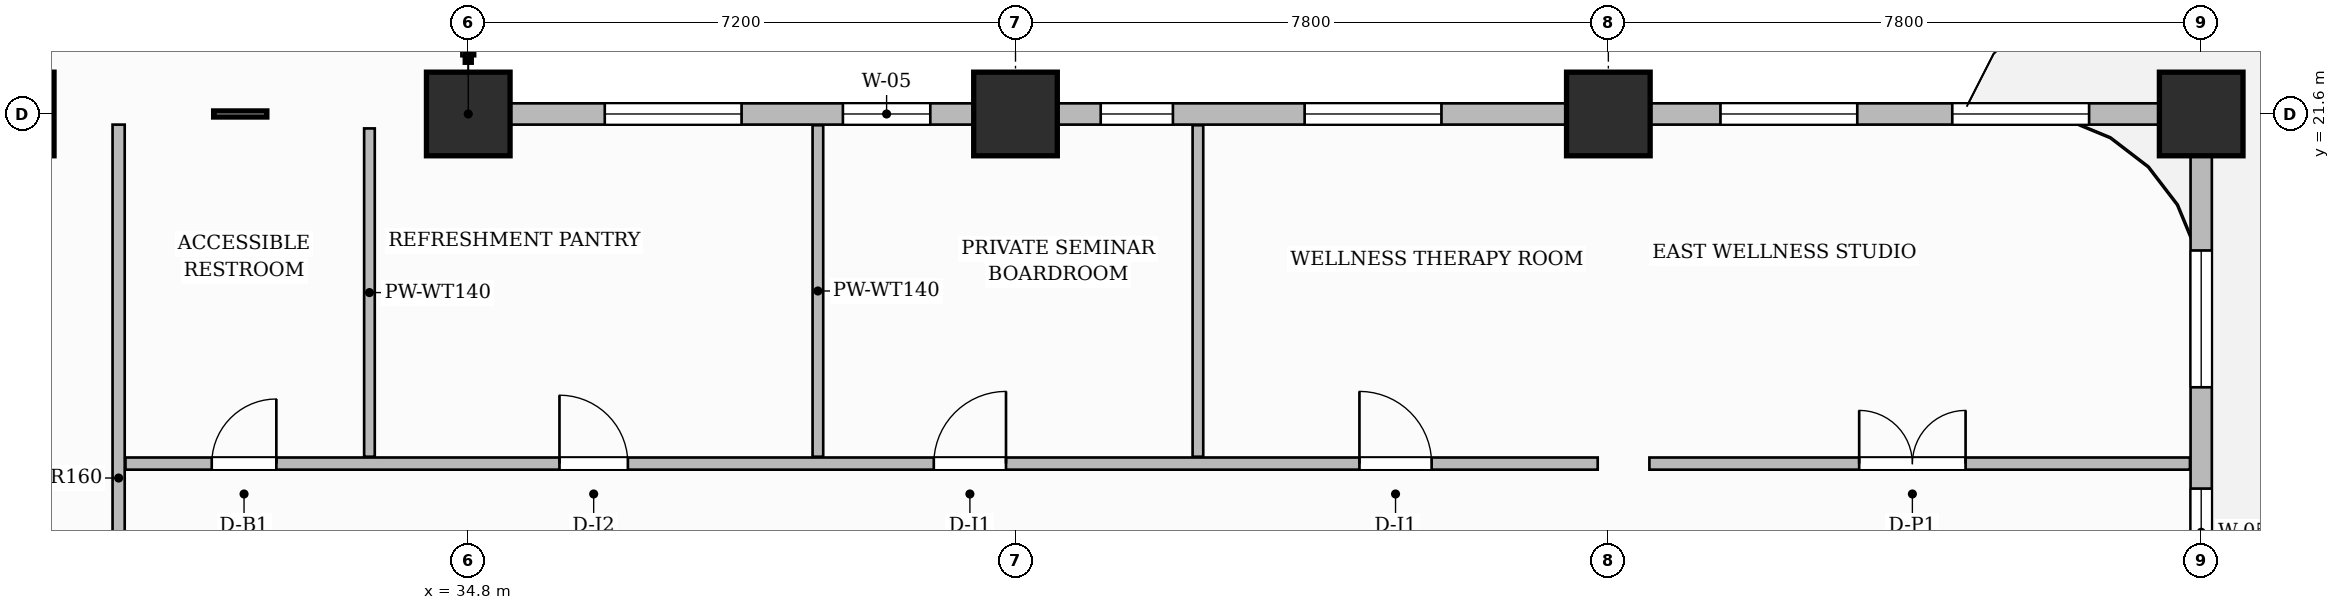
"""IFC4 building model, lengths in metres.
Left out: names, types, materials, properties, quantities, classifications, styles, units other than length and angle.
Written with IfcOpenShell. Run it as: python <this file> out.ifc"""

import sys

from ifc_helpers import new_model, si_unit, direction, frame, frame_2d, origin, origin_2d, place, context, subcontext, project, spatial, rectangle, extrude, source, transform, mapped, element, fill, save


model = new_model("IFC4")
c1 = context("Model", 3, precision=1e-05, world=origin(), true_north=direction((0.0, 1.0)))
c2 = subcontext(c1, "Body", "Model", "MODEL_VIEW")
j1 = project(units=[si_unit("LENGTHUNIT", "METRE"), si_unit("PLANEANGLEUNIT", "RADIAN")], contexts=[c1])
p1 = place(None, origin())
s1 = spatial("IfcSite", under=j1, at=p1, CompositionType="ELEMENT")
p2 = place(p1, origin())
s2 = spatial("IfcBuilding", under=s1, at=p2, CompositionType="ELEMENT")
p3 = place(p2, frame((0.0, 0.0, 65.7)))
s3 = spatial("IfcBuildingStorey", under=s2, at=p3, CompositionType="ELEMENT", Elevation=65.7)
m1 = source(origin(), c2, "Body", "SweptSolid", [
    extrude(rectangle(XDim=1.1, YDim=1.1, at=origin_2d()), origin(), (0.0, 0.0, 1.0), 3.7),
])
for number, where, z_axis, x_axis in (
    (1, (28.8, 21.6, 0.0), (0.0, 0.0, 1.0), (1.0, 0.0, 0.0)),
    (2, (34.8, 21.6, 0.0), (0.0, 0.0, 1.0), (1.0, 0.0, 0.0)),
    (3, (42.0, 21.6, 0.0), (0.0, 0.0, 1.0), (1.0, 0.0, 0.0)),
    (4, (49.8, 21.6, 0.0), (0.0, 0.0, 1.0), (1.0, 0.0, 0.0)),
    (5, (57.6, 21.6, 0.0), (0.0, 0.0, 1.0), (1.0, 0.0, 0.0)),
):
    element("IfcColumn", number, at=place(p3, frame(where, z_axis=z_axis, x_axis=x_axis)), inside=s3, PredefinedType="COLUMN", context=c2, shape_type="MappedRepresentation", body=[
        mapped(m1, transform((0.0, 0.0, 0.0), scale=1.0)),
    ])
p4 = place(p3, frame((30.2, 12.16, 0.0), z_axis=(0.0, 0.0, 1.0), x_axis=(0.0, 1.0, 0.0)))
e6 = element("IfcWall", 6, at=p4, inside=s3, PredefinedType="PARTITIONING", context=c2, shape_type="SweptSolid", body=[
    extrude(rectangle(XDim=9.3, YDim=0.16, at=frame_2d((4.65, 0.0))), origin(), (0.0, 0.0, 1.0), 3.45),
])
p5 = place(p3, frame((30.29, 17.0, 0.0), z_axis=(0.0, 0.0, 1.0), x_axis=(1.0, 0.0, 0.0)))
e7 = element("IfcWall", 7, at=p5, inside=s3, PredefinedType="PARTITIONING", context=c2, shape_type="SweptSolid", body=[
    extrude(rectangle(XDim=19.37, YDim=0.16, at=frame_2d((9.685, 0.0))), origin(), (0.0, 0.0, 1.0), 3.45),
])
p6 = place(p5, frame((1.135, 0.0, 0.0)))
e8 = element("IfcOpeningElement", 8, at=p6, cuts=e7, PredefinedType="OPENING", context=c2, shape_type="SweptSolid", body=[
    extrude(rectangle(XDim=0.85, YDim=2.1, at=frame_2d((0.425, 1.05))), frame((0.0, 0.09, 0.0), z_axis=(0.0, -1.0, 0.0), x_axis=(1.0, 0.0, 0.0)), (0.0, 0.0, 1.0), 0.18),
])
p7 = place(p5, frame((5.71, 0.0, 0.0)))
e9 = element("IfcOpeningElement", 9, at=p7, cuts=e7, PredefinedType="OPENING", context=c2, shape_type="SweptSolid", body=[
    extrude(rectangle(XDim=0.9, YDim=2.15, at=frame_2d((0.45, 1.075))), frame((0.0, 0.09, 0.0), z_axis=(0.0, -1.0, 0.0), x_axis=(1.0, 0.0, 0.0)), (0.0, 0.0, 1.0), 0.18),
])
p8 = place(p5, frame((10.635, 0.0, 0.0)))
e10 = element("IfcOpeningElement", 10, at=p8, cuts=e7, PredefinedType="OPENING", context=c2, shape_type="SweptSolid", body=[
    extrude(rectangle(XDim=0.95, YDim=2.15, at=frame_2d((0.475, 1.075))), frame((0.0, 0.09, 0.0), z_axis=(0.0, -1.0, 0.0), x_axis=(1.0, 0.0, 0.0)), (0.0, 0.0, 1.0), 0.18),
])
p9 = place(p5, frame((16.235, 0.0, 0.0)))
e11 = element("IfcOpeningElement", 11, at=p9, cuts=e7, PredefinedType="OPENING", context=c2, shape_type="SweptSolid", body=[
    extrude(rectangle(XDim=0.95, YDim=2.15, at=frame_2d((0.475, 1.075))), frame((0.0, 0.09, 0.0), z_axis=(0.0, -1.0, 0.0), x_axis=(1.0, 0.0, 0.0)), (0.0, 0.0, 1.0), 0.18),
])
p10 = place(p3, frame((50.34, 17.0, 0.0), z_axis=(0.0, 0.0, 1.0), x_axis=(1.0, 0.0, 0.0)))
e12 = element("IfcWall", 12, at=p10, inside=s3, PredefinedType="PARTITIONING", context=c2, shape_type="SweptSolid", body=[
    extrude(rectangle(XDim=7.112, YDim=0.16, at=frame_2d((3.556, 0.0))), origin(), (0.0, 0.0, 1.0), 3.45),
])
p11 = place(p10, frame((2.76, 0.0, 0.0)))
e13 = element("IfcOpeningElement", 13, at=p11, cuts=e12, PredefinedType="OPENING", context=c2, shape_type="SweptSolid", body=[
    extrude(rectangle(XDim=1.4, YDim=2.35, at=frame_2d((0.7, 1.175))), frame((0.0, 0.09, 0.0), z_axis=(0.0, -1.0, 0.0), x_axis=(1.0, 0.0, 0.0)), (0.0, 0.0, 1.0), 0.18),
])
p12 = place(p3, frame((33.5, 17.09, 0.0), z_axis=(0.0, 0.0, 1.0), x_axis=(0.0, 1.0, 0.0)))
e14 = element("IfcWall", 14, at=p12, inside=s3, PredefinedType="PARTITIONING", context=c2, shape_type="SweptSolid", body=[
    extrude(rectangle(XDim=4.32, YDim=0.14, at=frame_2d((2.16, 0.0))), origin(), (0.0, 0.0, 1.0), 3.45),
])
for number, where, z_axis, x_axis in (
    (15, (39.4, 17.09, 0.0), (0.0, 0.0, 1.0), (0.0, 1.0, 0.0)),
    (16, (44.4, 17.09, 0.0), (0.0, 0.0, 1.0), (0.0, 1.0, 0.0)),
):
    element("IfcWall", number, at=place(p3, frame(where, z_axis=z_axis, x_axis=x_axis)), inside=s3, PredefinedType="PARTITIONING", context=c2, shape_type="SweptSolid", body=[
        extrude(rectangle(XDim=4.362, YDim=0.14, at=frame_2d((2.181, 0.0))), origin(), (0.0, 0.0, 1.0), 3.45),
    ])
p13 = place(p3, frame((57.6, 0.05, 0.0), z_axis=(0.0, 0.0, 1.0), x_axis=(0.0, 1.0, 0.0)))
e17 = element("IfcWall", 17, at=p13, inside=s3, PredefinedType="SOLIDWALL", context=c2, shape_type="SweptSolid", body=[
    extrude(rectangle(XDim=21.5, YDim=0.28, at=frame_2d((10.75, 0.0))), origin(), (0.0, 0.0, 1.0), 2.885),
])
p14 = place(p13, frame((2.75, 0.0, 0.0)))
e18 = element("IfcOpeningElement", 18, at=p14, cuts=e17, PredefinedType="OPENING", context=c2, shape_type="SweptSolid", body=[
    extrude(rectangle(XDim=1.2, YDim=2.2, at=frame_2d((0.6, 1.1))), frame((0.0, 0.15, 0.0), z_axis=(0.0, -1.0, 0.0), x_axis=(1.0, 0.0, 0.0)), (0.0, 0.0, 1.0), 0.3),
])
p15 = place(p13, frame((1.025, 0.0, 0.8)))
e19 = element("IfcOpeningElement", 19, at=p15, cuts=e17, PredefinedType="OPENING", context=c2, shape_type="SweptSolid", body=[
    extrude(rectangle(XDim=1.15, YDim=1.8, at=frame_2d((0.575, 0.9))), frame((0.0, 0.15, 0.0), z_axis=(0.0, -1.0, 0.0), x_axis=(1.0, 0.0, 0.0)), (0.0, 0.0, 1.0), 0.3),
])
p16 = place(p13, frame((4.6, 0.0, 0.8)))
e20 = element("IfcOpeningElement", 20, at=p16, cuts=e17, PredefinedType="OPENING", context=c2, shape_type="SweptSolid", body=[
    extrude(rectangle(XDim=1.4, YDim=1.85, at=frame_2d((0.7, 0.925))), frame((0.0, 0.15, 0.0), z_axis=(0.0, -1.0, 0.0), x_axis=(1.0, 0.0, 0.0)), (0.0, 0.0, 1.0), 0.3),
])
p17 = place(p13, frame((8.475, 0.0, 0.8)))
e21 = element("IfcOpeningElement", 21, at=p17, cuts=e17, PredefinedType="OPENING", context=c2, shape_type="SweptSolid", body=[
    extrude(rectangle(XDim=1.8, YDim=1.85, at=frame_2d((0.9, 0.925))), frame((0.0, 0.15, 0.0), z_axis=(0.0, -1.0, 0.0), x_axis=(1.0, 0.0, 0.0)), (0.0, 0.0, 1.0), 0.3),
])
p18 = place(p13, frame((11.225, 0.0, 0.8)))
e22 = element("IfcOpeningElement", 22, at=p18, cuts=e17, PredefinedType="OPENING", context=c2, shape_type="SweptSolid", body=[
    extrude(rectangle(XDim=1.8, YDim=1.85, at=frame_2d((0.9, 0.925))), frame((0.0, 0.15, 0.0), z_axis=(0.0, -1.0, 0.0), x_axis=(1.0, 0.0, 0.0)), (0.0, 0.0, 1.0), 0.3),
])
p19 = place(p13, frame((15.471, 0.0, 0.8)))
e23 = element("IfcOpeningElement", 23, at=p19, cuts=e17, PredefinedType="OPENING", context=c2, shape_type="SweptSolid", body=[
    extrude(rectangle(XDim=1.15, YDim=1.8, at=frame_2d((0.575, 0.9))), frame((0.0, 0.15, 0.0), z_axis=(0.0, -1.0, 0.0), x_axis=(1.0, 0.0, 0.0)), (0.0, 0.0, 1.0), 0.3),
])
p20 = place(p13, frame((17.954, 0.0, 0.8)))
e24 = element("IfcOpeningElement", 24, at=p20, cuts=e17, PredefinedType="OPENING", context=c2, shape_type="SweptSolid", body=[
    extrude(rectangle(XDim=1.8, YDim=1.85, at=frame_2d((0.9, 0.925))), frame((0.0, 0.15, 0.0), z_axis=(0.0, -1.0, 0.0), x_axis=(1.0, 0.0, 0.0)), (0.0, 0.0, 1.0), 0.3),
])
p21 = place(p3, frame((34.8, 21.6, 0.0), z_axis=(0.0, 0.0, 1.0), x_axis=(1.0, 0.0, 0.0)))
e25 = element("IfcWall", 25, at=p21, inside=s3, PredefinedType="SOLIDWALL", context=c2, shape_type="SweptSolid", body=[
    extrude(rectangle(XDim=22.8, YDim=0.28, at=frame_2d((11.4, 0.0))), origin(), (0.0, 0.0, 1.0), 2.885),
])
p22 = place(p21, frame((1.796, 0.0, 0.8)))
e26 = element("IfcOpeningElement", 26, at=p22, cuts=e25, PredefinedType="OPENING", context=c2, shape_type="SweptSolid", body=[
    extrude(rectangle(XDim=1.8, YDim=1.85, at=frame_2d((0.9, 0.925))), frame((0.0, 0.15, 0.0), z_axis=(0.0, -1.0, 0.0), x_axis=(1.0, 0.0, 0.0)), (0.0, 0.0, 1.0), 0.3),
])
p23 = place(p21, frame((4.929, 0.0, 0.8)))
e27 = element("IfcOpeningElement", 27, at=p23, cuts=e25, PredefinedType="OPENING", context=c2, shape_type="SweptSolid", body=[
    extrude(rectangle(XDim=1.15, YDim=1.8, at=frame_2d((0.575, 0.9))), frame((0.0, 0.15, 0.0), z_axis=(0.0, -1.0, 0.0), x_axis=(1.0, 0.0, 0.0)), (0.0, 0.0, 1.0), 0.3),
])
p24 = place(p21, frame((8.321, 0.0, 0.8)))
e28 = element("IfcOpeningElement", 28, at=p24, cuts=e25, PredefinedType="OPENING", context=c2, shape_type="SweptSolid", body=[
    extrude(rectangle(XDim=0.95, YDim=1.75, at=frame_2d((0.475, 0.875))), frame((0.0, 0.15, 0.0), z_axis=(0.0, -1.0, 0.0), x_axis=(1.0, 0.0, 0.0)), (0.0, 0.0, 1.0), 0.3),
])
p25 = place(p21, frame((11.004, 0.0, 0.8)))
e29 = element("IfcOpeningElement", 29, at=p25, cuts=e25, PredefinedType="OPENING", context=c2, shape_type="SweptSolid", body=[
    extrude(rectangle(XDim=1.8, YDim=1.85, at=frame_2d((0.9, 0.925))), frame((0.0, 0.15, 0.0), z_axis=(0.0, -1.0, 0.0), x_axis=(1.0, 0.0, 0.0)), (0.0, 0.0, 1.0), 0.3),
])
p26 = place(p21, frame((16.475, 0.0, 0.8)))
e30 = element("IfcOpeningElement", 30, at=p26, cuts=e25, PredefinedType="OPENING", context=c2, shape_type="SweptSolid", body=[
    extrude(rectangle(XDim=1.8, YDim=1.85, at=frame_2d((0.9, 0.925))), frame((0.0, 0.15, 0.0), z_axis=(0.0, -1.0, 0.0), x_axis=(1.0, 0.0, 0.0)), (0.0, 0.0, 1.0), 0.3),
])
p27 = place(p21, frame((19.525, 0.0, 0.8)))
e31 = element("IfcOpeningElement", 31, at=p27, cuts=e25, PredefinedType="OPENING", context=c2, shape_type="SweptSolid", body=[
    extrude(rectangle(XDim=1.8, YDim=1.85, at=frame_2d((0.9, 0.925))), frame((0.0, 0.15, 0.0), z_axis=(0.0, -1.0, 0.0), x_axis=(1.0, 0.0, 0.0)), (0.0, 0.0, 1.0), 0.3),
])
m2 = source(origin(), c2, "Body", "SweptSolid", [
    extrude(rectangle(XDim=1.4, YDim=2.35, at=frame_2d((0.7, 1.175))), frame((0.0, 0.025, 0.0), z_axis=(0.0, -1.0, 0.0), x_axis=(1.0, 0.0, 0.0)), (0.0, 0.0, 1.0), 0.05),
])
p28 = place(p11, origin())
e32 = element("IfcDoor", 32, at=p28, inside=s3, OperationType="DOUBLE_DOOR_SINGLE_SWING", PredefinedType="DOOR", context=c2, shape_type="MappedRepresentation", body=[
    mapped(m2, transform((0.0, 0.0, 0.0), scale=1.0)),
])
fill(e13, e32)
m3 = source(origin(), c2, "Body", "SweptSolid", [
    extrude(rectangle(XDim=0.85, YDim=2.1, at=frame_2d((0.425, 1.05))), frame((0.0, 0.025, 0.0), z_axis=(0.0, -1.0, 0.0), x_axis=(1.0, 0.0, 0.0)), (0.0, 0.0, 1.0), 0.05),
])
p29 = place(p6, origin())
e33 = element("IfcDoor", 33, at=p29, inside=s3, OperationType="SINGLE_SWING_RIGHT", PredefinedType="DOOR", context=c2, shape_type="MappedRepresentation", body=[
    mapped(m3, transform((0.0, 0.0, 0.0), scale=1.0)),
])
fill(e8, e33)
m4 = source(origin(), c2, "Body", "SweptSolid", [
    extrude(rectangle(XDim=0.9, YDim=2.15, at=frame_2d((0.45, 1.075))), frame((0.0, 0.025, 0.0), z_axis=(0.0, -1.0, 0.0), x_axis=(1.0, 0.0, 0.0)), (0.0, 0.0, 1.0), 0.05),
])
p30 = place(p7, origin())
e34 = element("IfcDoor", 34, at=p30, inside=s3, OperationType="SINGLE_SWING_LEFT", PredefinedType="DOOR", context=c2, shape_type="MappedRepresentation", body=[
    mapped(m4, transform((0.0, 0.0, 0.0), scale=1.0)),
])
fill(e9, e34)
m5 = source(origin(), c2, "Body", "SweptSolid", [
    extrude(rectangle(XDim=0.95, YDim=2.15, at=frame_2d((0.475, 1.075))), frame((0.0, 0.025, 0.0), z_axis=(0.0, -1.0, 0.0), x_axis=(1.0, 0.0, 0.0)), (0.0, 0.0, 1.0), 0.05),
])
p31 = place(p8, origin())
e35 = element("IfcDoor", 35, at=p31, inside=s3, OperationType="SINGLE_SWING_RIGHT", PredefinedType="DOOR", context=c2, shape_type="MappedRepresentation", body=[
    mapped(m5, transform((0.0, 0.0, 0.0), scale=1.0)),
])
fill(e10, e35)
p32 = place(p9, origin())
e36 = element("IfcDoor", 36, at=p32, inside=s3, OperationType="SINGLE_SWING_LEFT", PredefinedType="DOOR", context=c2, shape_type="MappedRepresentation", body=[
    mapped(m5, transform((0.0, 0.0, 0.0), scale=1.0)),
])
fill(e11, e36)
m6 = source(origin(), c2, "Body", "SweptSolid", [
    extrude(rectangle(XDim=1.15, YDim=1.8, at=frame_2d((0.575, 0.9))), frame((0.0, 0.03, 0.0), z_axis=(0.0, -1.0, 0.0), x_axis=(1.0, 0.0, 0.0)), (0.0, 0.0, 1.0), 0.06),
])
p33 = place(p19, origin())
e37 = element("IfcWindow", 37, at=p33, inside=s3, PartitioningType="SINGLE_PANEL", PredefinedType="WINDOW", context=c2, shape_type="MappedRepresentation", body=[
    mapped(m6, transform((0.0, 0.0, 0.0), scale=1.0)),
])
fill(e23, e37)
m7 = source(origin(), c2, "Body", "SweptSolid", [
    extrude(rectangle(XDim=1.8, YDim=1.85, at=frame_2d((0.9, 0.925))), frame((0.0, 0.03, 0.0), z_axis=(0.0, -1.0, 0.0), x_axis=(1.0, 0.0, 0.0)), (0.0, 0.0, 1.0), 0.06),
])
p34 = place(p20, origin())
e38 = element("IfcWindow", 38, at=p34, inside=s3, PartitioningType="DOUBLE_PANEL_VERTICAL", PredefinedType="WINDOW", context=c2, shape_type="MappedRepresentation", body=[
    mapped(m7, transform((0.0, 0.0, 0.0), scale=1.0)),
])
fill(e24, e38)
p35 = place(p22, origin())
e39 = element("IfcWindow", 39, at=p35, inside=s3, PartitioningType="DOUBLE_PANEL_VERTICAL", PredefinedType="WINDOW", context=c2, shape_type="MappedRepresentation", body=[
    mapped(m7, transform((0.0, 0.0, 0.0), scale=1.0)),
])
fill(e26, e39)
p36 = place(p23, origin())
e40 = element("IfcWindow", 40, at=p36, inside=s3, PartitioningType="SINGLE_PANEL", PredefinedType="WINDOW", context=c2, shape_type="MappedRepresentation", body=[
    mapped(m6, transform((0.0, 0.0, 0.0), scale=1.0)),
])
fill(e27, e40)
m8 = source(origin(), c2, "Body", "SweptSolid", [
    extrude(rectangle(XDim=0.95, YDim=1.75, at=frame_2d((0.475, 0.875))), frame((0.0, 0.03, 0.0), z_axis=(0.0, -1.0, 0.0), x_axis=(1.0, 0.0, 0.0)), (0.0, 0.0, 1.0), 0.06),
])
p37 = place(p24, origin())
e41 = element("IfcWindow", 41, at=p37, inside=s3, PartitioningType="SINGLE_PANEL", PredefinedType="WINDOW", context=c2, shape_type="MappedRepresentation", body=[
    mapped(m8, transform((0.0, 0.0, 0.0), scale=1.0)),
])
fill(e28, e41)
p38 = place(p25, origin())
e42 = element("IfcWindow", 42, at=p38, inside=s3, PartitioningType="DOUBLE_PANEL_VERTICAL", PredefinedType="WINDOW", context=c2, shape_type="MappedRepresentation", body=[
    mapped(m7, transform((0.0, 0.0, 0.0), scale=1.0)),
])
fill(e29, e42)
p39 = place(p26, origin())
e43 = element("IfcWindow", 43, at=p39, inside=s3, PartitioningType="DOUBLE_PANEL_VERTICAL", PredefinedType="WINDOW", context=c2, shape_type="MappedRepresentation", body=[
    mapped(m7, transform((0.0, 0.0, 0.0), scale=1.0)),
])
fill(e30, e43)
p40 = place(p27, origin())
e44 = element("IfcWindow", 44, at=p40, inside=s3, PartitioningType="DOUBLE_PANEL_VERTICAL", PredefinedType="WINDOW", context=c2, shape_type="MappedRepresentation", body=[
    mapped(m7, transform((0.0, 0.0, 0.0), scale=1.0)),
])
fill(e31, e44)
save(model, sys.argv[1])
